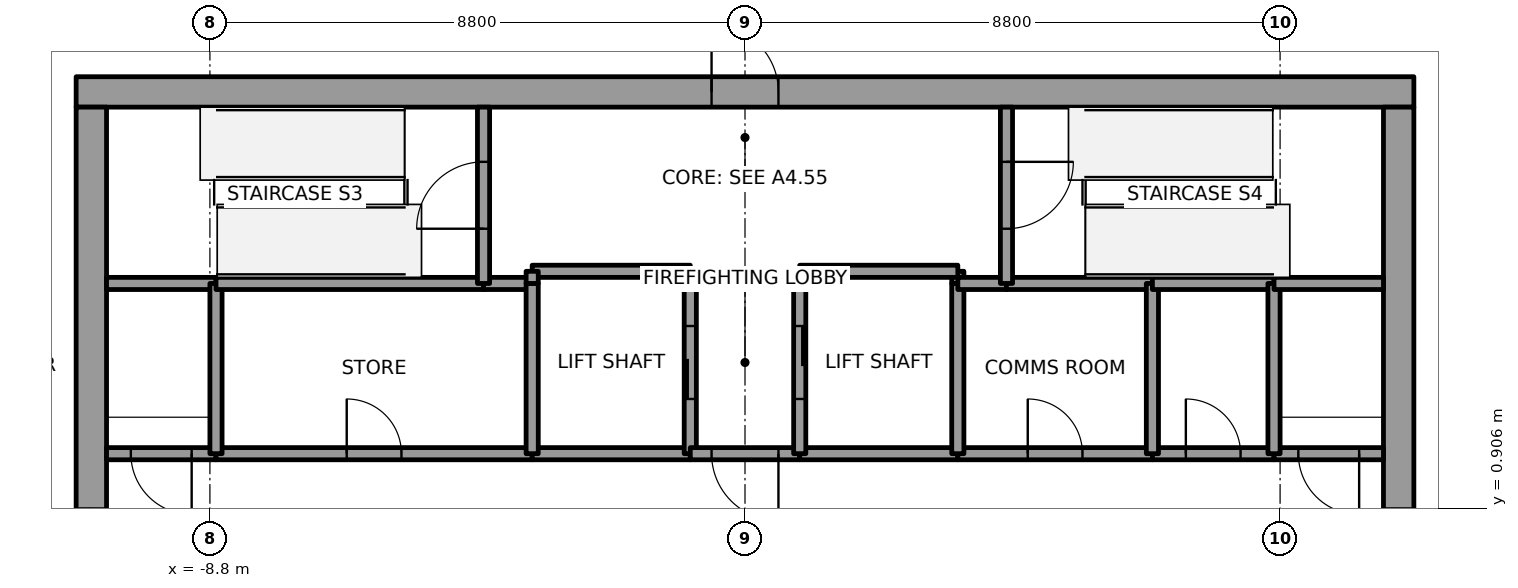
"""IFC4 building model, lengths in metres.
Left out: names, types, materials, properties, quantities, classifications, styles, units other than length and angle.
Written with IfcOpenShell. Run it as: python <this file> out.ifc"""

import sys

from ifc_helpers import new_model, si_unit, direction, frame, frame_2d, origin, place, context, subcontext, project, spatial, rectangle, extrude, element, fill, save


model = new_model("IFC4")
c1 = context("Model", 3, precision=1e-05, world=origin(), true_north=direction((0.0, 1.0)))
c2 = subcontext(c1, "Body", "Model", "MODEL_VIEW")
j1 = project(units=[si_unit("LENGTHUNIT", "METRE"), si_unit("PLANEANGLEUNIT", "RADIAN")], contexts=[c1])
p1 = place(None, origin())
s1 = spatial("IfcSite", under=j1, at=p1, CompositionType="ELEMENT")
p2 = place(p1, origin())
s2 = spatial("IfcBuilding", under=s1, at=p2, CompositionType="ELEMENT")
p3 = place(p2, frame((0.0, 0.0, 239.0)))
s3 = spatial("IfcBuildingStorey", under=s2, at=p3, CompositionType="ELEMENT", Elevation=239.0)
p4 = place(p3, frame((-11.0, 7.75, 0.0), z_axis=(0.0, 0.0, 1.0), x_axis=(1.0, 0.0, 0.0)))
e1 = element("IfcWall", 1, at=p4, inside=s3, PredefinedType="SHEAR", context=c2, shape_type="SweptSolid", body=[
    extrude(rectangle(XDim=22.0, YDim=0.5, at=frame_2d((11.0, 0.0))), origin(), (0.0, 0.0, 1.0), 4.0),
])
p5 = place(p4, frame((10.45, 0.0, 0.0)))
e2 = element("IfcOpeningElement", 2, at=p5, cuts=e1, PredefinedType="OPENING", context=c2, shape_type="SweptSolid", body=[
    extrude(rectangle(XDim=1.1, YDim=2.1, at=frame_2d((0.55, 1.05))), frame((0.0, 0.25, 0.0), z_axis=(0.0, -1.0, 0.0), x_axis=(1.0, 0.0, 0.0)), (0.0, 0.0, 1.0), 0.5),
])
p6 = place(p3, frame((-10.75, -7.5, 0.0), z_axis=(0.0, 0.0, 1.0), x_axis=(0.0, 1.0, 0.0)))
e3 = element("IfcWall", 3, at=p6, inside=s3, PredefinedType="SHEAR", context=c2, shape_type="SweptSolid", body=[
    extrude(rectangle(XDim=15.0, YDim=0.5, at=frame_2d((7.5, 0.0))), origin(), (0.0, 0.0, 1.0), 4.0),
])
p7 = place(p6, frame((6.6, 0.0, 0.0)))
e4 = element("IfcOpeningElement", 4, at=p7, cuts=e3, PredefinedType="OPENING", context=c2, shape_type="SweptSolid", body=[
    extrude(rectangle(XDim=1.8, YDim=2.1, at=frame_2d((0.9, 1.05))), frame((0.0, 0.25, 0.0), z_axis=(0.0, -1.0, 0.0), x_axis=(1.0, 0.0, 0.0)), (0.0, 0.0, 1.0), 0.5),
])
p8 = place(p3, frame((10.75, -7.5, 0.0), z_axis=(0.0, 0.0, 1.0), x_axis=(0.0, 1.0, 0.0)))
e5 = element("IfcWall", 5, at=p8, inside=s3, PredefinedType="SHEAR", context=c2, shape_type="SweptSolid", body=[
    extrude(rectangle(XDim=15.0, YDim=0.5, at=frame_2d((7.5, 0.0))), origin(), (0.0, 0.0, 1.0), 4.0),
])
p9 = place(p8, frame((6.6, 0.0, 0.0)))
e6 = element("IfcOpeningElement", 6, at=p9, cuts=e5, PredefinedType="OPENING", context=c2, shape_type="SweptSolid", body=[
    extrude(rectangle(XDim=1.8, YDim=2.1, at=frame_2d((0.9, 1.05))), frame((0.0, 0.25, 0.0), z_axis=(0.0, -1.0, 0.0), x_axis=(1.0, 0.0, 0.0)), (0.0, 0.0, 1.0), 0.5),
])
p10 = place(p3, frame((-8.7, 1.8, 0.0), z_axis=(0.0, 0.0, 1.0), x_axis=(-1.0, 0.0, 0.0)))
e7 = element("IfcWall", 7, at=p10, inside=s3, PredefinedType="SOLIDWALL", context=c2, shape_type="SweptSolid", body=[
    extrude(rectangle(XDim=1.8, YDim=0.2, at=frame_2d((0.9, 0.0))), origin(), (0.0, 0.0, 1.0), 3.85),
])
p11 = place(p10, frame((0.4, 0.0, 0.0)))
e8 = element("IfcOpeningElement", 8, at=p11, cuts=e7, PredefinedType="OPENING", context=c2, shape_type="SweptSolid", body=[
    extrude(rectangle(XDim=1.0, YDim=2.1, at=frame_2d((0.5, 1.05))), frame((0.0, 0.1, 0.0), z_axis=(0.0, -1.0, 0.0), x_axis=(1.0, 0.0, 0.0)), (0.0, 0.0, 1.0), 0.2),
])
p12 = place(p3, frame((-8.7, 4.6, 0.0), z_axis=(0.0, 0.0, 1.0), x_axis=(-1.0, 0.0, 0.0)))
e9 = element("IfcWall", 9, at=p12, inside=s3, PredefinedType="SOLIDWALL", context=c2, shape_type="SweptSolid", body=[
    extrude(rectangle(XDim=1.8, YDim=0.2, at=frame_2d((0.9, 0.0))), origin(), (0.0, 0.0, 1.0), 3.85),
])
p13 = place(p3, frame((-8.7, 1.8, 0.0), z_axis=(0.0, 0.0, 1.0), x_axis=(1.0, 0.0, 0.0)))
e10 = element("IfcWall", 10, at=p13, inside=s3, PredefinedType="SOLIDWALL", context=c2, shape_type="SweptSolid", body=[
    extrude(rectangle(XDim=5.2, YDim=0.2, at=frame_2d((2.6, 0.0))), origin(), (0.0, 0.0, 1.0), 3.85),
])
p14 = place(p13, frame((2.15, 0.0, 0.0)))
e11 = element("IfcOpeningElement", 11, at=p14, cuts=e10, PredefinedType="OPENING", context=c2, shape_type="SweptSolid", body=[
    extrude(rectangle(XDim=0.9, YDim=2.1, at=frame_2d((0.45, 1.05))), frame((0.0, 0.1, 0.0), z_axis=(0.0, -1.0, 0.0), x_axis=(1.0, 0.0, 0.0)), (0.0, 0.0, 1.0), 0.2),
])
p15 = place(p3, frame((-8.7, 4.6, 0.0), z_axis=(0.0, 0.0, 1.0), x_axis=(0.0, -1.0, 0.0)))
e12 = element("IfcWall", 12, at=p15, inside=s3, PredefinedType="SOLIDWALL", context=c2, shape_type="SweptSolid", body=[
    extrude(rectangle(XDim=2.8, YDim=0.2, at=frame_2d((1.4, 0.0))), origin(), (0.0, 0.0, 1.0), 3.85),
])
p16 = place(p3, frame((-4.3, 4.6, 0.0), z_axis=(0.0, 0.0, 1.0), x_axis=(-1.0, 0.0, 0.0)))
e13 = element("IfcWall", 13, at=p16, inside=s3, PredefinedType="SOLIDWALL", context=c2, shape_type="SweptSolid", body=[
    extrude(rectangle(XDim=4.4, YDim=0.2, at=frame_2d((2.2, 0.0))), origin(), (0.0, 0.0, 1.0), 3.85),
])
p17 = place(p3, frame((-3.5, 4.6, 0.0), z_axis=(0.0, 0.0, 1.0), x_axis=(-1.0, 0.0, 0.0)))
e14 = element("IfcWall", 14, at=p17, inside=s3, PredefinedType="SOLIDWALL", context=c2, shape_type="SweptSolid", body=[
    extrude(rectangle(XDim=0.8, YDim=0.2, at=frame_2d((0.4, 0.0))), origin(), (0.0, 0.0, 1.0), 3.85),
])
p18 = place(p3, frame((-4.3, 4.6, 0.0), z_axis=(0.0, 0.0, 1.0), x_axis=(0.0, 1.0, 0.0)))
e15 = element("IfcWall", 15, at=p18, inside=s3, PredefinedType="SOLIDWALL", context=c2, shape_type="SweptSolid", body=[
    extrude(rectangle(XDim=2.9, YDim=0.2, at=frame_2d((1.45, 0.0))), origin(), (0.0, 0.0, 1.0), 3.85),
])
p19 = place(p18, frame((0.9, 0.0, 0.0)))
e16 = element("IfcOpeningElement", 16, at=p19, cuts=e15, PredefinedType="OPENING", context=c2, shape_type="SweptSolid", body=[
    extrude(rectangle(XDim=1.1, YDim=2.1, at=frame_2d((0.55, 1.05))), frame((0.0, 0.1, 0.0), z_axis=(0.0, -1.0, 0.0), x_axis=(1.0, 0.0, 0.0)), (0.0, 0.0, 1.0), 0.2),
])
p20 = place(p3, frame((-0.9, 1.8, 0.0), z_axis=(0.0, 0.0, 1.0), x_axis=(-1.0, 0.0, 0.0)))
e17 = element("IfcWall", 17, at=p20, inside=s3, PredefinedType="SOLIDWALL", context=c2, shape_type="SweptSolid", body=[
    extrude(rectangle(XDim=2.6, YDim=0.2, at=frame_2d((1.3, 0.0))), origin(), (0.0, 0.0, 1.0), 3.85),
])
p21 = place(p3, frame((-3.5, 1.8, 0.0), z_axis=(0.0, 0.0, 1.0), x_axis=(0.0, 1.0, 0.0)))
e18 = element("IfcWall", 18, at=p21, inside=s3, PredefinedType="SOLIDWALL", context=c2, shape_type="SweptSolid", body=[
    extrude(rectangle(XDim=2.8, YDim=0.2, at=frame_2d((1.4, 0.0))), origin(), (0.0, 0.0, 1.0), 3.85),
])
p22 = place(p3, frame((-0.9, 1.8, 0.0), z_axis=(0.0, 0.0, 1.0), x_axis=(0.0, 1.0, 0.0)))
e19 = element("IfcWall", 19, at=p22, inside=s3, PredefinedType="SOLIDWALL", context=c2, shape_type="SweptSolid", body=[
    extrude(rectangle(XDim=3.0, YDim=0.2, at=frame_2d((1.5, 0.0))), origin(), (0.0, 0.0, 1.0), 3.85),
])
p23 = place(p22, frame((0.9, 0.0, 0.0)))
e20 = element("IfcOpeningElement", 20, at=p23, cuts=e19, PredefinedType="OPENING", context=c2, shape_type="SweptSolid", body=[
    extrude(rectangle(XDim=1.2, YDim=2.1, at=frame_2d((0.6, 1.05))), frame((0.0, 0.1, 0.0), z_axis=(0.0, -1.0, 0.0), x_axis=(1.0, 0.0, 0.0)), (0.0, 0.0, 1.0), 0.2),
])
p24 = place(p3, frame((-0.9, 4.8, 0.0), z_axis=(0.0, 0.0, 1.0), x_axis=(-1.0, 0.0, 0.0)))
e21 = element("IfcWall", 21, at=p24, inside=s3, PredefinedType="SOLIDWALL", context=c2, shape_type="SweptSolid", body=[
    extrude(rectangle(XDim=2.6, YDim=0.2, at=frame_2d((1.3, 0.0))), origin(), (0.0, 0.0, 1.0), 3.85),
])
p25 = place(p3, frame((-3.5, 4.8, 0.0), z_axis=(0.0, 0.0, 1.0), x_axis=(0.0, -1.0, 0.0)))
e22 = element("IfcWall", 22, at=p25, inside=s3, PredefinedType="SOLIDWALL", context=c2, shape_type="SweptSolid", body=[
    extrude(rectangle(XDim=0.2, YDim=0.2, at=frame_2d((0.1, 0.0))), origin(), (0.0, 0.0, 1.0), 3.85),
])
p26 = place(p3, frame((0.9, 1.8, 0.0), z_axis=(0.0, 0.0, 1.0), x_axis=(-1.0, 0.0, 0.0)))
e23 = element("IfcWall", 23, at=p26, inside=s3, PredefinedType="SOLIDWALL", context=c2, shape_type="SweptSolid", body=[
    extrude(rectangle(XDim=1.8, YDim=0.2, at=frame_2d((0.9, 0.0))), origin(), (0.0, 0.0, 1.0), 3.85),
])
p27 = place(p26, frame((0.35, 0.0, 0.0)))
e24 = element("IfcOpeningElement", 24, at=p27, cuts=e23, PredefinedType="OPENING", context=c2, shape_type="SweptSolid", body=[
    extrude(rectangle(XDim=1.1, YDim=2.1, at=frame_2d((0.55, 1.05))), frame((0.0, 0.1, 0.0), z_axis=(0.0, -1.0, 0.0), x_axis=(1.0, 0.0, 0.0)), (0.0, 0.0, 1.0), 0.2),
])
p28 = place(p3, frame((3.5, 1.8, 0.0), z_axis=(0.0, 0.0, 1.0), x_axis=(-1.0, 0.0, 0.0)))
e25 = element("IfcWall", 25, at=p28, inside=s3, PredefinedType="SOLIDWALL", context=c2, shape_type="SweptSolid", body=[
    extrude(rectangle(XDim=2.6, YDim=0.2, at=frame_2d((1.3, 0.0))), origin(), (0.0, 0.0, 1.0), 3.85),
])
p29 = place(p3, frame((3.5, 4.6, 0.0), z_axis=(0.0, 0.0, 1.0), x_axis=(0.0, 1.0, 0.0)))
e26 = element("IfcWall", 26, at=p29, inside=s3, PredefinedType="SOLIDWALL", context=c2, shape_type="SweptSolid", body=[
    extrude(rectangle(XDim=0.2, YDim=0.2, at=frame_2d((0.1, 0.0))), origin(), (0.0, 0.0, 1.0), 3.85),
])
p30 = place(p3, frame((3.5, 4.8, 0.0), z_axis=(0.0, 0.0, 1.0), x_axis=(-1.0, 0.0, 0.0)))
e27 = element("IfcWall", 27, at=p30, inside=s3, PredefinedType="SOLIDWALL", context=c2, shape_type="SweptSolid", body=[
    extrude(rectangle(XDim=2.6, YDim=0.2, at=frame_2d((1.3, 0.0))), origin(), (0.0, 0.0, 1.0), 3.85),
])
p31 = place(p3, frame((0.9, 4.8, 0.0), z_axis=(0.0, 0.0, 1.0), x_axis=(0.0, -1.0, 0.0)))
e28 = element("IfcWall", 28, at=p31, inside=s3, PredefinedType="SOLIDWALL", context=c2, shape_type="SweptSolid", body=[
    extrude(rectangle(XDim=3.0, YDim=0.2, at=frame_2d((1.5, 0.0))), origin(), (0.0, 0.0, 1.0), 3.85),
])
p32 = place(p31, frame((0.9, 0.0, 0.0)))
e29 = element("IfcOpeningElement", 29, at=p32, cuts=e28, PredefinedType="OPENING", context=c2, shape_type="SweptSolid", body=[
    extrude(rectangle(XDim=1.2, YDim=2.1, at=frame_2d((0.6, 1.05))), frame((0.0, 0.1, 0.0), z_axis=(0.0, -1.0, 0.0), x_axis=(1.0, 0.0, 0.0)), (0.0, 0.0, 1.0), 0.2),
])
p33 = place(p3, frame((3.5, 1.8, 0.0), z_axis=(0.0, 0.0, 1.0), x_axis=(1.0, 0.0, 0.0)))
e30 = element("IfcWall", 30, at=p33, inside=s3, PredefinedType="SOLIDWALL", context=c2, shape_type="SweptSolid", body=[
    extrude(rectangle(XDim=3.2, YDim=0.2, at=frame_2d((1.6, 0.0))), origin(), (0.0, 0.0, 1.0), 3.85),
])
p34 = place(p33, frame((1.15, 0.0, 0.0)))
e31 = element("IfcOpeningElement", 31, at=p34, cuts=e30, PredefinedType="OPENING", context=c2, shape_type="SweptSolid", body=[
    extrude(rectangle(XDim=0.9, YDim=2.1, at=frame_2d((0.45, 1.05))), frame((0.0, 0.1, 0.0), z_axis=(0.0, -1.0, 0.0), x_axis=(1.0, 0.0, 0.0)), (0.0, 0.0, 1.0), 0.2),
])
p35 = place(p3, frame((3.5, 4.6, 0.0), z_axis=(0.0, 0.0, 1.0), x_axis=(0.0, -1.0, 0.0)))
e32 = element("IfcWall", 32, at=p35, inside=s3, PredefinedType="SOLIDWALL", context=c2, shape_type="SweptSolid", body=[
    extrude(rectangle(XDim=2.8, YDim=0.2, at=frame_2d((1.4, 0.0))), origin(), (0.0, 0.0, 1.0), 3.85),
])
p36 = place(p3, frame((4.3, 4.6, 0.0), z_axis=(0.0, 0.0, 1.0), x_axis=(-1.0, 0.0, 0.0)))
e33 = element("IfcWall", 33, at=p36, inside=s3, PredefinedType="SOLIDWALL", context=c2, shape_type="SweptSolid", body=[
    extrude(rectangle(XDim=0.8, YDim=0.2, at=frame_2d((0.4, 0.0))), origin(), (0.0, 0.0, 1.0), 3.85),
])
p37 = place(p3, frame((6.7, 4.6, 0.0), z_axis=(0.0, 0.0, 1.0), x_axis=(-1.0, 0.0, 0.0)))
e34 = element("IfcWall", 34, at=p37, inside=s3, PredefinedType="SOLIDWALL", context=c2, shape_type="SweptSolid", body=[
    extrude(rectangle(XDim=2.4, YDim=0.2, at=frame_2d((1.2, 0.0))), origin(), (0.0, 0.0, 1.0), 3.85),
])
p38 = place(p3, frame((4.3, 7.5, 0.0), z_axis=(0.0, 0.0, 1.0), x_axis=(0.0, -1.0, 0.0)))
e35 = element("IfcWall", 35, at=p38, inside=s3, PredefinedType="SOLIDWALL", context=c2, shape_type="SweptSolid", body=[
    extrude(rectangle(XDim=2.9, YDim=0.2, at=frame_2d((1.45, 0.0))), origin(), (0.0, 0.0, 1.0), 3.85),
])
p39 = place(p38, frame((0.9, 0.0, 0.0)))
e36 = element("IfcOpeningElement", 36, at=p39, cuts=e35, PredefinedType="OPENING", context=c2, shape_type="SweptSolid", body=[
    extrude(rectangle(XDim=1.1, YDim=2.1, at=frame_2d((0.55, 1.05))), frame((0.0, 0.1, 0.0), z_axis=(0.0, -1.0, 0.0), x_axis=(1.0, 0.0, 0.0)), (0.0, 0.0, 1.0), 0.2),
])
p40 = place(p3, frame((6.7, 1.8, 0.0), z_axis=(0.0, 0.0, 1.0), x_axis=(1.0, 0.0, 0.0)))
e37 = element("IfcWall", 37, at=p40, inside=s3, PredefinedType="SOLIDWALL", context=c2, shape_type="SweptSolid", body=[
    extrude(rectangle(XDim=2.0, YDim=0.2, at=frame_2d((1.0, 0.0))), origin(), (0.0, 0.0, 1.0), 3.85),
])
p41 = place(p40, frame((0.55, 0.0, 0.0)))
e38 = element("IfcOpeningElement", 38, at=p41, cuts=e37, PredefinedType="OPENING", context=c2, shape_type="SweptSolid", body=[
    extrude(rectangle(XDim=0.9, YDim=2.1, at=frame_2d((0.45, 1.05))), frame((0.0, 0.1, 0.0), z_axis=(0.0, -1.0, 0.0), x_axis=(1.0, 0.0, 0.0)), (0.0, 0.0, 1.0), 0.2),
])
p42 = place(p3, frame((6.7, 1.8, 0.0), z_axis=(0.0, 0.0, 1.0), x_axis=(0.0, 1.0, 0.0)))
e39 = element("IfcWall", 39, at=p42, inside=s3, PredefinedType="SOLIDWALL", context=c2, shape_type="SweptSolid", body=[
    extrude(rectangle(XDim=2.8, YDim=0.2, at=frame_2d((1.4, 0.0))), origin(), (0.0, 0.0, 1.0), 3.85),
])
p43 = place(p3, frame((8.7, 4.6, 0.0), z_axis=(0.0, 0.0, 1.0), x_axis=(-1.0, 0.0, 0.0)))
e40 = element("IfcWall", 40, at=p43, inside=s3, PredefinedType="SOLIDWALL", context=c2, shape_type="SweptSolid", body=[
    extrude(rectangle(XDim=2.0, YDim=0.2, at=frame_2d((1.0, 0.0))), origin(), (0.0, 0.0, 1.0), 3.85),
])
p44 = place(p3, frame((10.5, 1.8, 0.0), z_axis=(0.0, 0.0, 1.0), x_axis=(-1.0, 0.0, 0.0)))
e41 = element("IfcWall", 41, at=p44, inside=s3, PredefinedType="SOLIDWALL", context=c2, shape_type="SweptSolid", body=[
    extrude(rectangle(XDim=1.8, YDim=0.2, at=frame_2d((0.9, 0.0))), origin(), (0.0, 0.0, 1.0), 3.85),
])
p45 = place(p44, frame((0.4, 0.0, 0.0)))
e42 = element("IfcOpeningElement", 42, at=p45, cuts=e41, PredefinedType="OPENING", context=c2, shape_type="SweptSolid", body=[
    extrude(rectangle(XDim=1.0, YDim=2.1, at=frame_2d((0.5, 1.05))), frame((0.0, 0.1, 0.0), z_axis=(0.0, -1.0, 0.0), x_axis=(1.0, 0.0, 0.0)), (0.0, 0.0, 1.0), 0.2),
])
p46 = place(p3, frame((8.7, 1.8, 0.0), z_axis=(0.0, 0.0, 1.0), x_axis=(0.0, 1.0, 0.0)))
e43 = element("IfcWall", 43, at=p46, inside=s3, PredefinedType="SOLIDWALL", context=c2, shape_type="SweptSolid", body=[
    extrude(rectangle(XDim=2.8, YDim=0.2, at=frame_2d((1.4, 0.0))), origin(), (0.0, 0.0, 1.0), 3.85),
])
p47 = place(p3, frame((10.5, 4.6, 0.0), z_axis=(0.0, 0.0, 1.0), x_axis=(-1.0, 0.0, 0.0)))
e44 = element("IfcWall", 44, at=p47, inside=s3, PredefinedType="SOLIDWALL", context=c2, shape_type="SweptSolid", body=[
    extrude(rectangle(XDim=1.8, YDim=0.2, at=frame_2d((0.9, 0.0))), origin(), (0.0, 0.0, 1.0), 3.85),
])
p48 = place(p23, origin())
e45 = element("IfcDoor", 45, at=p48, inside=s3, OperationType="SLIDING_TO_RIGHT", PredefinedType="DOOR", context=c2, shape_type="SweptSolid", body=[
    extrude(rectangle(XDim=1.2, YDim=2.1, at=frame_2d((0.6, 1.05))), frame((0.0, 0.025, 0.0), z_axis=(0.0, -1.0, 0.0), x_axis=(1.0, 0.0, 0.0)), (0.0, 0.0, 1.0), 0.05),
])
fill(e20, e45)
p49 = place(p32, origin())
e46 = element("IfcDoor", 46, at=p49, inside=s3, OperationType="SLIDING_TO_LEFT", PredefinedType="DOOR", context=c2, shape_type="SweptSolid", body=[
    extrude(rectangle(XDim=1.2, YDim=2.1, at=frame_2d((0.6, 1.05))), frame((0.0, 0.025, 0.0), z_axis=(0.0, -1.0, 0.0), x_axis=(1.0, 0.0, 0.0)), (0.0, 0.0, 1.0), 0.05),
])
fill(e29, e46)
p50 = place(p27, origin())
e47 = element("IfcDoor", 47, at=p50, inside=s3, OperationType="SINGLE_SWING_LEFT", PredefinedType="DOOR", context=c2, shape_type="SweptSolid", body=[
    extrude(rectangle(XDim=1.1, YDim=2.1, at=frame_2d((0.55, 1.05))), frame((0.0, 0.025, 0.0), z_axis=(0.0, -1.0, 0.0), x_axis=(1.0, 0.0, 0.0)), (0.0, 0.0, 1.0), 0.05),
])
fill(e24, e47)
p51 = place(p11, origin())
e48 = element("IfcDoor", 48, at=p51, inside=s3, OperationType="SINGLE_SWING_LEFT", PredefinedType="DOOR", context=c2, shape_type="SweptSolid", body=[
    extrude(rectangle(XDim=1.0, YDim=2.1, at=frame_2d((0.5, 1.05))), frame((0.0, 0.025, 0.0), z_axis=(0.0, -1.0, 0.0), x_axis=(1.0, 0.0, 0.0)), (0.0, 0.0, 1.0), 0.05),
])
fill(e8, e48)
p52 = place(p45, origin())
e49 = element("IfcDoor", 49, at=p52, inside=s3, OperationType="SINGLE_SWING_RIGHT", PredefinedType="DOOR", context=c2, shape_type="SweptSolid", body=[
    extrude(rectangle(XDim=1.0, YDim=2.1, at=frame_2d((0.5, 1.05))), frame((0.0, 0.025, 0.0), z_axis=(0.0, -1.0, 0.0), x_axis=(1.0, 0.0, 0.0)), (0.0, 0.0, 1.0), 0.05),
])
fill(e42, e49)
p53 = place(p19, origin())
e50 = element("IfcDoor", 50, at=p53, inside=s3, OperationType="SINGLE_SWING_RIGHT", PredefinedType="DOOR", context=c2, shape_type="SweptSolid", body=[
    extrude(rectangle(XDim=1.1, YDim=2.1, at=frame_2d((0.55, 1.05))), frame((0.0, 0.025, 0.0), z_axis=(0.0, -1.0, 0.0), x_axis=(1.0, 0.0, 0.0)), (0.0, 0.0, 1.0), 0.05),
])
fill(e16, e50)
p54 = place(p39, origin())
e51 = element("IfcDoor", 51, at=p54, inside=s3, OperationType="SINGLE_SWING_RIGHT", PredefinedType="DOOR", context=c2, shape_type="SweptSolid", body=[
    extrude(rectangle(XDim=1.1, YDim=2.1, at=frame_2d((0.55, 1.05))), frame((0.0, 0.025, 0.0), z_axis=(0.0, -1.0, 0.0), x_axis=(1.0, 0.0, 0.0)), (0.0, 0.0, 1.0), 0.05),
])
fill(e36, e51)
p55 = place(p34, origin())
e52 = element("IfcDoor", 52, at=p55, inside=s3, OperationType="SINGLE_SWING_LEFT", PredefinedType="DOOR", context=c2, shape_type="SweptSolid", body=[
    extrude(rectangle(XDim=0.9, YDim=2.1, at=frame_2d((0.45, 1.05))), frame((0.0, 0.025, 0.0), z_axis=(0.0, -1.0, 0.0), x_axis=(1.0, 0.0, 0.0)), (0.0, 0.0, 1.0), 0.05),
])
fill(e31, e52)
p56 = place(p41, origin())
e53 = element("IfcDoor", 53, at=p56, inside=s3, OperationType="SINGLE_SWING_LEFT", PredefinedType="DOOR", context=c2, shape_type="SweptSolid", body=[
    extrude(rectangle(XDim=0.9, YDim=2.1, at=frame_2d((0.45, 1.05))), frame((0.0, 0.025, 0.0), z_axis=(0.0, -1.0, 0.0), x_axis=(1.0, 0.0, 0.0)), (0.0, 0.0, 1.0), 0.05),
])
fill(e38, e53)
p57 = place(p14, origin())
e54 = element("IfcDoor", 54, at=p57, inside=s3, OperationType="SINGLE_SWING_RIGHT", PredefinedType="DOOR", context=c2, shape_type="SweptSolid", body=[
    extrude(rectangle(XDim=0.9, YDim=2.1, at=frame_2d((0.45, 1.05))), frame((0.0, 0.025, 0.0), z_axis=(0.0, -1.0, 0.0), x_axis=(1.0, 0.0, 0.0)), (0.0, 0.0, 1.0), 0.05),
])
fill(e11, e54)
p58 = place(p7, origin())
e55 = element("IfcDoor", 55, at=p58, inside=s3, OperationType="DOUBLE_DOOR_SINGLE_SWING", PredefinedType="DOOR", context=c2, shape_type="SweptSolid", body=[
    extrude(rectangle(XDim=1.8, YDim=2.1, at=frame_2d((0.9, 1.05))), frame((0.0, 0.025, 0.0), z_axis=(0.0, -1.0, 0.0), x_axis=(1.0, 0.0, 0.0)), (0.0, 0.0, 1.0), 0.05),
])
fill(e4, e55)
p59 = place(p9, origin())
e56 = element("IfcDoor", 56, at=p59, inside=s3, OperationType="DOUBLE_DOOR_SINGLE_SWING", PredefinedType="DOOR", context=c2, shape_type="SweptSolid", body=[
    extrude(rectangle(XDim=1.8, YDim=2.1, at=frame_2d((0.9, 1.05))), frame((0.0, 0.025, 0.0), z_axis=(0.0, -1.0, 0.0), x_axis=(1.0, 0.0, 0.0)), (0.0, 0.0, 1.0), 0.05),
])
fill(e6, e56)
p60 = place(p5, origin())
e57 = element("IfcDoor", 57, at=p60, inside=s3, OperationType="SINGLE_SWING_RIGHT", PredefinedType="DOOR", context=c2, shape_type="SweptSolid", body=[
    extrude(rectangle(XDim=1.1, YDim=2.1, at=frame_2d((0.55, 1.05))), frame((0.0, 0.025, 0.0), z_axis=(0.0, -1.0, 0.0), x_axis=(1.0, 0.0, 0.0)), (0.0, 0.0, 1.0), 0.05),
])
fill(e2, e57)
save(model, sys.argv[1])
